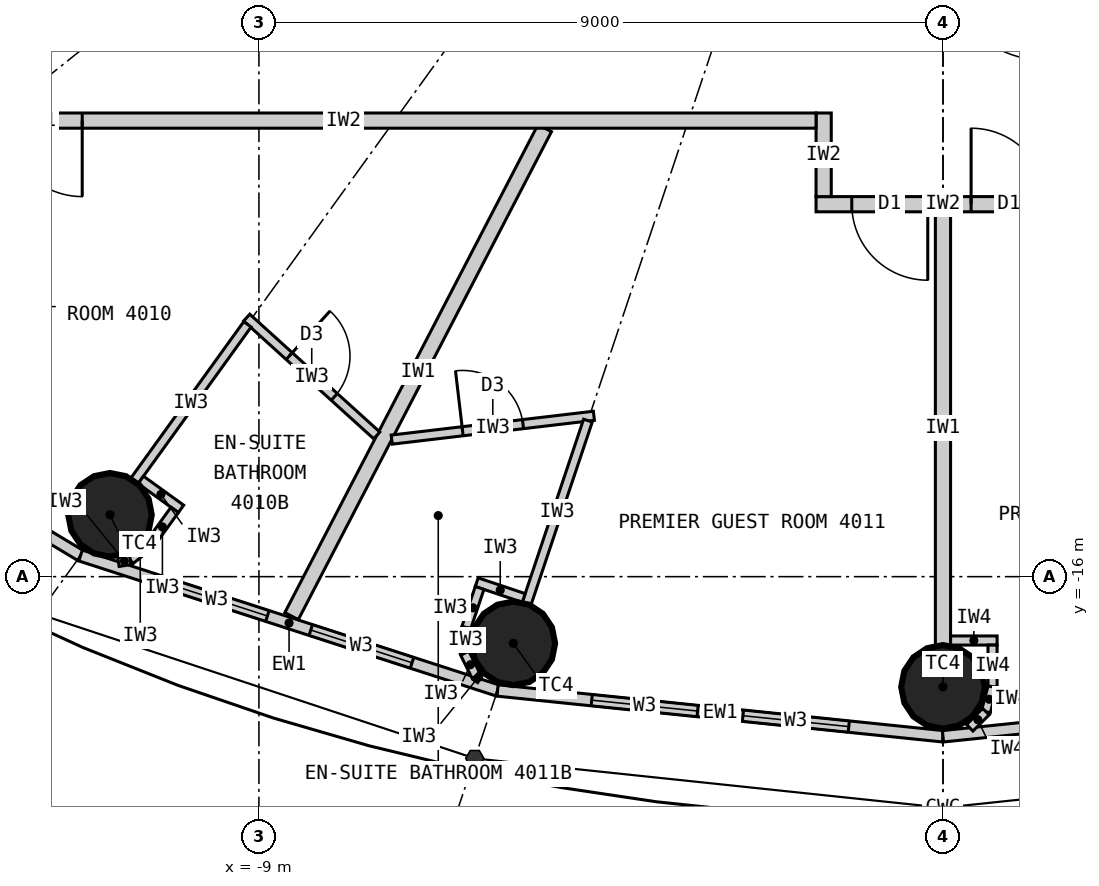
"""IFC4 building model, lengths in metres.
Left out: names, types, materials, properties, quantities, classifications, styles, units other than length and angle.
Written with IfcOpenShell. Run it as: python <this file> out.ifc"""

import sys

from ifc_helpers import new_model, si_unit, direction, frame, frame_2d, origin, origin_2d, place, context, subcontext, project, spatial, rectangle, circle, extrude, element, fill, save


model = new_model("IFC4")
c1 = context("Model", 3, precision=1e-05, world=origin(), true_north=direction((0.0, 1.0)))
c2 = subcontext(c1, "Body", "Model", "MODEL_VIEW")
j1 = project(units=[si_unit("LENGTHUNIT", "METRE"), si_unit("PLANEANGLEUNIT", "RADIAN")], contexts=[c1])
p1 = place(None, origin())
s1 = spatial("IfcSite", under=j1, at=p1, CompositionType="ELEMENT")
p2 = place(p1, origin())
s2 = spatial("IfcBuilding", under=s1, at=p2, CompositionType="ELEMENT")
p3 = place(p2, frame((0.0, 0.0, 153.3)))
s3 = spatial("IfcBuildingStorey", under=s2, at=p3, CompositionType="ELEMENT", Elevation=153.3)
for number, where, z_axis, x_axis in (
    (1, (-10.96, -15.186, 0.0), (0.0, 0.0, 1.0), (1.0, 0.0, 0.0)),
    (2, (-5.653, -16.877, 0.0), (0.0, 0.0, 1.0), (1.0, 0.0, 0.0)),
    (3, (0.0, -17.45, 0.0), (0.0, 0.0, 1.0), (1.0, 0.0, 0.0)),
):
    element("IfcColumn", number, at=place(p3, frame(where, z_axis=z_axis, x_axis=x_axis)), inside=s3, PredefinedType="COLUMN", context=c2, shape_type="SweptSolid", body=[
        extrude(circle(Radius=0.55, at=origin_2d()), origin(), (0.0, 0.0, 1.0), 3.3),
    ])
p4 = place(p3, frame((-16.095, -12.876, 0.0), z_axis=(0.0, 0.0, 1.0), x_axis=(0.857695199231, -0.514158482587, 0.0)))
e4 = element("IfcWall", 4, at=p4, inside=s3, PredefinedType="ELEMENTEDWALL", context=c2, shape_type="SweptSolid", body=[
    extrude(rectangle(XDim=5.536, YDim=0.15, at=frame_2d((2.768, 0.0))), origin(), (0.0, 0.0, 1.0), 3.12),
])
p5 = place(p4, frame((1.068, 0.0, 0.9)))
e5 = element("IfcOpeningElement", 5, at=p5, cuts=e4, PredefinedType="OPENING", context=c2, shape_type="SweptSolid", body=[
    extrude(rectangle(XDim=1.4, YDim=1.9, at=frame_2d((0.7, 0.95))), frame((0.0, 0.085, 0.0), z_axis=(0.0, -1.0, 0.0), x_axis=(1.0, 0.0, 0.0)), (0.0, 0.0, 1.0), 0.17),
])
p6 = place(p4, frame((3.068, 0.0, 0.9)))
e6 = element("IfcOpeningElement", 6, at=p6, cuts=e4, PredefinedType="OPENING", context=c2, shape_type="SweptSolid", body=[
    extrude(rectangle(XDim=1.4, YDim=1.9, at=frame_2d((0.7, 0.95))), frame((0.0, 0.085, 0.0), z_axis=(0.0, -1.0, 0.0), x_axis=(1.0, 0.0, 0.0)), (0.0, 0.0, 1.0), 0.17),
])
p7 = place(p3, frame((-11.346, -15.722, 0.0), z_axis=(0.0, 0.0, 1.0), x_axis=(0.951432482129, -0.307857486429, 0.0)))
e7 = element("IfcWall", 7, at=p7, inside=s3, PredefinedType="ELEMENTEDWALL", context=c2, shape_type="SweptSolid", body=[
    extrude(rectangle(XDim=5.766, YDim=0.15, at=frame_2d((2.883, 0.0))), origin(), (0.0, 0.0, 1.0), 3.12),
])
p8 = place(p7, frame((1.183, 0.0, 0.9)))
e8 = element("IfcOpeningElement", 8, at=p8, cuts=e7, PredefinedType="OPENING", context=c2, shape_type="SweptSolid", body=[
    extrude(rectangle(XDim=1.4, YDim=1.9, at=frame_2d((0.7, 0.95))), frame((0.0, 0.085, 0.0), z_axis=(0.0, -1.0, 0.0), x_axis=(1.0, 0.0, 0.0)), (0.0, 0.0, 1.0), 0.17),
])
p9 = place(p7, frame((3.183, 0.0, 0.9)))
e9 = element("IfcOpeningElement", 9, at=p9, cuts=e7, PredefinedType="OPENING", context=c2, shape_type="SweptSolid", body=[
    extrude(rectangle(XDim=1.4, YDim=1.9, at=frame_2d((0.7, 0.95))), frame((0.0, 0.085, 0.0), z_axis=(0.0, -1.0, 0.0), x_axis=(1.0, 0.0, 0.0)), (0.0, 0.0, 1.0), 0.17),
])
p10 = place(p3, frame((-5.86, -17.497, 0.0), z_axis=(0.0, 0.0, 1.0), x_axis=(0.994751738032, -0.102318032045, 0.0)))
e10 = element("IfcWall", 10, at=p10, inside=s3, PredefinedType="ELEMENTEDWALL", context=c2, shape_type="SweptSolid", body=[
    extrude(rectangle(XDim=5.891, YDim=0.15, at=frame_2d((2.946, 0.0))), origin(), (0.0, 0.0, 1.0), 3.12),
])
p11 = place(p10, frame((1.246, 0.0, 0.9)))
e11 = element("IfcOpeningElement", 11, at=p11, cuts=e10, PredefinedType="OPENING", context=c2, shape_type="SweptSolid", body=[
    extrude(rectangle(XDim=1.4, YDim=1.9, at=frame_2d((0.7, 0.95))), frame((0.0, 0.085, 0.0), z_axis=(0.0, -1.0, 0.0), x_axis=(1.0, 0.0, 0.0)), (0.0, 0.0, 1.0), 0.17),
])
p12 = place(p10, frame((3.246, 0.0, 0.9)))
e12 = element("IfcOpeningElement", 12, at=p12, cuts=e10, PredefinedType="OPENING", context=c2, shape_type="SweptSolid", body=[
    extrude(rectangle(XDim=1.4, YDim=1.9, at=frame_2d((0.7, 0.95))), frame((0.0, 0.085, 0.0), z_axis=(0.0, -1.0, 0.0), x_axis=(1.0, 0.0, 0.0)), (0.0, 0.0, 1.0), 0.17),
])
p13 = place(p3, frame((0.0, -18.1, 0.0), z_axis=(0.0, 0.0, 1.0), x_axis=(0.994751738032, 0.102318032045, 0.0)))
e13 = element("IfcWall", 13, at=p13, inside=s3, PredefinedType="ELEMENTEDWALL", context=c2, shape_type="SweptSolid", body=[
    extrude(rectangle(XDim=5.891, YDim=0.15, at=frame_2d((2.946, 0.0))), origin(), (0.0, 0.0, 1.0), 3.12),
])
p14 = place(p13, frame((1.246, 0.0, 0.9)))
e14 = element("IfcOpeningElement", 14, at=p14, cuts=e13, PredefinedType="OPENING", context=c2, shape_type="SweptSolid", body=[
    extrude(rectangle(XDim=1.4, YDim=1.9, at=frame_2d((0.7, 0.95))), frame((0.0, 0.085, 0.0), z_axis=(0.0, -1.0, 0.0), x_axis=(1.0, 0.0, 0.0)), (0.0, 0.0, 1.0), 0.17),
])
p15 = place(p13, frame((3.246, 0.0, 0.9)))
e15 = element("IfcOpeningElement", 15, at=p15, cuts=e13, PredefinedType="OPENING", context=c2, shape_type="SweptSolid", body=[
    extrude(rectangle(XDim=1.4, YDim=1.9, at=frame_2d((0.7, 0.95))), frame((0.0, 0.085, 0.0), z_axis=(0.0, -1.0, 0.0), x_axis=(1.0, 0.0, 0.0)), (0.0, 0.0, 1.0), 0.17),
])
p16 = place(p3, frame((-5.24, -10.1, 0.0), z_axis=(0.0, 0.0, 1.0), x_axis=(-0.460532965373, -0.887642601391, 0.0)))
e16 = element("IfcWall", 16, at=p16, inside=s3, PredefinedType="PARTITIONING", context=c2, shape_type="SweptSolid", body=[
    extrude(rectangle(XDim=7.231, YDim=0.2, at=frame_2d((3.616, 0.0))), origin(), (0.0, 0.0, 1.0), 3.12),
])
p17 = place(p3, frame((0.0, -11.2, 0.0), z_axis=(0.0, 0.0, 1.0), x_axis=(0.0, -1.0, 0.0)))
e17 = element("IfcWall", 17, at=p17, inside=s3, PredefinedType="PARTITIONING", context=c2, shape_type="SweptSolid", body=[
    extrude(rectangle(XDim=5.7, YDim=0.2, at=frame_2d((2.85, 0.0))), origin(), (0.0, 0.0, 1.0), 2.42),
])
p18 = place(p3, frame((1.67, -11.1, 0.0), z_axis=(0.0, 0.0, 1.0), x_axis=(-1.0, 0.0, 0.0)))
e18 = element("IfcWall", 18, at=p18, inside=s3, PredefinedType="PARTITIONING", context=c2, shape_type="SweptSolid", body=[
    extrude(rectangle(XDim=3.34, YDim=0.2, at=frame_2d((1.67, 0.0))), origin(), (0.0, 0.0, 1.0), 3.12),
])
p19 = place(p18, frame((1.87, 0.0, 0.0)))
e19 = element("IfcOpeningElement", 19, at=p19, cuts=e18, PredefinedType="OPENING", context=c2, shape_type="SweptSolid", body=[
    extrude(rectangle(XDim=1.0, YDim=2.2, at=frame_2d((0.5, 1.1))), frame((0.0, 0.11, 0.0), z_axis=(0.0, -1.0, 0.0), x_axis=(1.0, 0.0, 0.0)), (0.0, 0.0, 1.0), 0.22),
])
p20 = place(p18, frame((0.3, 0.0, 0.0)))
e20 = element("IfcOpeningElement", 20, at=p20, cuts=e18, PredefinedType="OPENING", context=c2, shape_type="SweptSolid", body=[
    extrude(rectangle(XDim=1.0, YDim=2.2, at=frame_2d((0.5, 1.1))), frame((0.0, 0.11, 0.0), z_axis=(0.0, -1.0, 0.0), x_axis=(1.0, 0.0, 0.0)), (0.0, 0.0, 1.0), 0.22),
])
p21 = place(p3, frame((-1.57, -9.9, 0.0), z_axis=(0.0, 0.0, 1.0), x_axis=(0.0, -1.0, 0.0)))
e21 = element("IfcWall", 21, at=p21, inside=s3, PredefinedType="PARTITIONING", context=c2, shape_type="SweptSolid", body=[
    extrude(rectangle(XDim=1.1, YDim=0.2, at=frame_2d((0.55, 0.0))), origin(), (0.0, 0.0, 1.0), 3.12),
])
p22 = place(p3, frame((-7.45, -14.142, 0.0), z_axis=(0.0, 0.0, 1.0), x_axis=(-0.74113984586, 0.671350675041, 0.0)))
e22 = element("IfcWall", 22, at=p22, inside=s3, PredefinedType="PARTITIONING", context=c2, shape_type="SweptSolid", body=[
    extrude(rectangle(XDim=2.309, YDim=0.12, at=frame_2d((1.154, 0.0))), origin(), (0.0, 0.0, 1.0), 3.12),
])
p23 = place(p22, frame((0.754, 0.0, 0.0)))
e23 = element("IfcOpeningElement", 23, at=p23, cuts=e22, PredefinedType="OPENING", context=c2, shape_type="SweptSolid", body=[
    extrude(rectangle(XDim=0.8, YDim=2.1, at=frame_2d((0.4, 1.05))), frame((0.0, 0.07, 0.0), z_axis=(0.0, -1.0, 0.0), x_axis=(1.0, 0.0, 0.0)), (0.0, 0.0, 1.0), 0.14),
])
p24 = place(p3, frame((-9.151, -12.681, 0.0), z_axis=(0.0, 0.0, 1.0), x_axis=(-0.585258912334, -0.8108464747, 0.0)))
e24 = element("IfcWall", 24, at=p24, inside=s3, PredefinedType="PARTITIONING", context=c2, shape_type="SweptSolid", body=[
    extrude(rectangle(XDim=2.54, YDim=0.12, at=frame_2d((1.27, 0.0))), origin(), (0.0, 0.0, 1.0), 2.42),
])
p25 = place(p3, frame((-10.554, -14.727, 0.0), z_axis=(0.0, 0.0, 1.0), x_axis=(0.811044231224, -0.584984833135, 0.0)))
e25 = element("IfcWall", 25, at=p25, inside=s3, PredefinedType="PARTITIONING", context=c2, shape_type="SweptSolid", body=[
    extrude(rectangle(XDim=0.652, YDim=0.12, at=frame_2d((0.326, 0.0))), origin(), (0.0, 0.0, 1.0), 3.12),
])
p26 = place(p3, frame((-10.109, -15.122, 0.0), z_axis=(0.0, 0.0, 1.0), x_axis=(-0.585344718358, -0.810784534072, 0.0)))
e26 = element("IfcWall", 26, at=p26, inside=s3, PredefinedType="PARTITIONING", context=c2, shape_type="SweptSolid", body=[
    extrude(rectangle(XDim=0.55, YDim=0.12, at=frame_2d((0.275, 0.0))), origin(), (0.0, 0.0, 1.0), 3.12),
])
p27 = place(p3, frame((-10.431, -15.568, 0.0), z_axis=(0.0, 0.0, 1.0), x_axis=(-0.77505137267, -0.631898227345, 0.0)))
e27 = element("IfcWall", 27, at=p27, inside=s3, PredefinedType="PARTITIONING", context=c2, shape_type="SweptSolid", body=[
    extrude(rectangle(XDim=0.338, YDim=0.12, at=frame_2d((0.169, 0.0))), origin(), (0.0, 0.0, 1.0), 3.12),
])
p28 = place(p3, frame((-10.693, -15.781, 0.0), z_axis=(0.0, 0.0, 1.0), x_axis=(-0.987256785332, -0.159135287777, 0.0)))
e28 = element("IfcWall", 28, at=p28, inside=s3, PredefinedType="PARTITIONING", context=c2, shape_type="SweptSolid", body=[
    extrude(rectangle(XDim=0.158, YDim=0.12, at=frame_2d((0.079, 0.0))), origin(), (0.0, 0.0, 1.0), 3.12),
])
p29 = place(p3, frame((-7.253, -14.197, 0.0), z_axis=(0.0, 0.0, 1.0), x_axis=(0.993128188393, 0.117031625725, 0.0)))
e29 = element("IfcWall", 29, at=p29, inside=s3, PredefinedType="PARTITIONING", context=c2, shape_type="SweptSolid", body=[
    extrude(rectangle(XDim=2.678, YDim=0.12, at=frame_2d((1.339, 0.0))), origin(), (0.0, 0.0, 1.0), 3.12),
])
p30 = place(p29, frame((0.939, 0.0, 0.0)))
e30 = element("IfcOpeningElement", 30, at=p30, cuts=e29, PredefinedType="OPENING", context=c2, shape_type="SweptSolid", body=[
    extrude(rectangle(XDim=0.8, YDim=2.1, at=frame_2d((0.4, 1.05))), frame((0.0, 0.07, 0.0), z_axis=(0.0, -1.0, 0.0), x_axis=(1.0, 0.0, 0.0)), (0.0, 0.0, 1.0), 0.14),
])
p31 = place(p3, frame((-4.671, -13.948, 0.0), z_axis=(0.0, 0.0, 1.0), x_axis=(-0.317669167093, -0.948201613729, 0.0)))
e31 = element("IfcWall", 31, at=p31, inside=s3, PredefinedType="PARTITIONING", context=c2, shape_type="SweptSolid", body=[
    extrude(rectangle(XDim=2.54, YDim=0.12, at=frame_2d((1.27, 0.0))), origin(), (0.0, 0.0, 1.0), 2.42),
])
p32 = place(p3, frame((-5.516, -16.28, 0.0), z_axis=(0.0, 0.0, 1.0), x_axis=(-0.948157944392, 0.317799484717, 0.0)))
e32 = element("IfcWall", 32, at=p32, inside=s3, PredefinedType="PARTITIONING", context=c2, shape_type="SweptSolid", body=[
    extrude(rectangle(XDim=0.652, YDim=0.12, at=frame_2d((0.326, 0.0))), origin(), (0.0, 0.0, 1.0), 3.12),
])
p33 = place(p3, frame((-6.097, -16.149, 0.0), z_axis=(0.0, 0.0, 1.0), x_axis=(-0.317292604854, -0.948327687514, 0.0)))
e33 = element("IfcWall", 33, at=p33, inside=s3, PredefinedType="PARTITIONING", context=c2, shape_type="SweptSolid", body=[
    extrude(rectangle(XDim=0.55, YDim=0.12, at=frame_2d((0.275, 0.0))), origin(), (0.0, 0.0, 1.0), 3.12),
])
for number, where, z_axis, x_axis in (
    (34, (-6.271, -16.67, 0.0), (0.0, 0.0, 1.0), (-0.061, -0.998, 0.0)),
    (35, (-6.292, -17.007, 0.0), (0.0, 0.0, 1.0), (0.445, -0.895, 0.0)),
):
    element("IfcWall", number, at=place(p3, frame(where, z_axis=z_axis, x_axis=x_axis)), inside=s3, PredefinedType="PARTITIONING", context=c2, shape_type="SweptSolid", body=[
        extrude(rectangle(XDim=0.338, YDim=0.12, at=frame_2d((0.169, 0.0))), origin(), (0.0, 0.0, 1.0), 3.12),
    ])
p34 = place(p3, frame((-6.142, -17.31, 0.0), z_axis=(0.0, 0.0, 1.0), x_axis=(0.835039693181, -0.550189704386, 0.0)))
e36 = element("IfcWall", 36, at=p34, inside=s3, PredefinedType="PARTITIONING", context=c2, shape_type="SweptSolid", body=[
    extrude(rectangle(XDim=0.062, YDim=0.12, at=frame_2d((0.031, 0.0))), origin(), (0.0, 0.0, 1.0), 3.12),
])
p35 = place(p3, frame((-1.67, -10.0, 0.0), z_axis=(0.0, 0.0, 1.0), x_axis=(-1.0, 0.0, 0.0)))
e37 = element("IfcWall", 37, at=p35, inside=s3, PredefinedType="PARTITIONING", context=c2, shape_type="SweptSolid", body=[
    extrude(rectangle(XDim=12.43, YDim=0.2, at=frame_2d((6.215, 0.0))), origin(), (0.0, 0.0, 1.0), 3.12),
])
p36 = place(p35, frame((9.655, 0.0, 0.0)))
e38 = element("IfcOpeningElement", 38, at=p36, cuts=e37, PredefinedType="OPENING", context=c2, shape_type="SweptSolid", body=[
    extrude(rectangle(XDim=1.0, YDim=2.2, at=frame_2d((0.5, 1.1))), frame((0.0, 0.11, 0.0), z_axis=(0.0, -1.0, 0.0), x_axis=(1.0, 0.0, 0.0)), (0.0, 0.0, 1.0), 0.22),
])
p37 = place(p3, frame((0.1, -16.84, 0.0), z_axis=(0.0, 0.0, 1.0), x_axis=(1.0, 0.0, 0.0)))
e39 = element("IfcWall", 39, at=p37, inside=s3, PredefinedType="PARTITIONING", context=c2, shape_type="SweptSolid", body=[
    extrude(rectangle(XDim=0.612, YDim=0.12, at=frame_2d((0.306, 0.0))), origin(), (0.0, 0.0, 1.0), 3.12),
])
p38 = place(p3, frame((0.652, -16.9, 0.0), z_axis=(0.0, 0.0, 1.0), x_axis=(0.0, -1.0, 0.0)))
e40 = element("IfcWall", 40, at=p38, inside=s3, PredefinedType="PARTITIONING", context=c2, shape_type="SweptSolid", body=[
    extrude(rectangle(XDim=0.55, YDim=0.12, at=frame_2d((0.275, 0.0))), origin(), (0.0, 0.0, 1.0), 3.12),
])
p39 = place(p3, frame((0.652, -17.45, 0.0), z_axis=(0.0, 0.0, 1.0), x_axis=(-0.258832454679, -0.965922233104, 0.0)))
e41 = element("IfcWall", 41, at=p39, inside=s3, PredefinedType="PARTITIONING", context=c2, shape_type="SweptSolid", body=[
    extrude(rectangle(XDim=0.338, YDim=0.12, at=frame_2d((0.169, 0.0))), origin(), (0.0, 0.0, 1.0), 3.12),
])
p40 = place(p3, frame((0.565, -17.776, 0.0), z_axis=(0.0, 0.0, 1.0), x_axis=(-0.707106781187, -0.707106781187, 0.0)))
e42 = element("IfcWall", 42, at=p40, inside=s3, PredefinedType="PARTITIONING", context=c2, shape_type="SweptSolid", body=[
    extrude(rectangle(XDim=0.301, YDim=0.12, at=frame_2d((0.15, 0.0))), origin(), (0.0, 0.0, 1.0), 3.12),
])
p41 = place(p8, origin())
e43 = element("IfcWindow", 43, at=p41, inside=s3, PartitioningType="SINGLE_PANEL", PredefinedType="WINDOW", context=c2, shape_type="SweptSolid", body=[
    extrude(rectangle(XDim=1.4, YDim=1.9, at=frame_2d((0.7, 0.95))), frame((0.0, 0.03, 0.0), z_axis=(0.0, -1.0, 0.0), x_axis=(1.0, 0.0, 0.0)), (0.0, 0.0, 1.0), 0.06),
])
fill(e8, e43)
p42 = place(p9, origin())
e44 = element("IfcWindow", 44, at=p42, inside=s3, PartitioningType="SINGLE_PANEL", PredefinedType="WINDOW", context=c2, shape_type="SweptSolid", body=[
    extrude(rectangle(XDim=1.4, YDim=1.9, at=frame_2d((0.7, 0.95))), frame((0.0, 0.03, 0.0), z_axis=(0.0, -1.0, 0.0), x_axis=(1.0, 0.0, 0.0)), (0.0, 0.0, 1.0), 0.06),
])
fill(e9, e44)
p43 = place(p11, origin())
e45 = element("IfcWindow", 45, at=p43, inside=s3, PartitioningType="SINGLE_PANEL", PredefinedType="WINDOW", context=c2, shape_type="SweptSolid", body=[
    extrude(rectangle(XDim=1.4, YDim=1.9, at=frame_2d((0.7, 0.95))), frame((0.0, 0.03, 0.0), z_axis=(0.0, -1.0, 0.0), x_axis=(1.0, 0.0, 0.0)), (0.0, 0.0, 1.0), 0.06),
])
fill(e11, e45)
p44 = place(p12, origin())
e46 = element("IfcWindow", 46, at=p44, inside=s3, PartitioningType="SINGLE_PANEL", PredefinedType="WINDOW", context=c2, shape_type="SweptSolid", body=[
    extrude(rectangle(XDim=1.4, YDim=1.9, at=frame_2d((0.7, 0.95))), frame((0.0, 0.03, 0.0), z_axis=(0.0, -1.0, 0.0), x_axis=(1.0, 0.0, 0.0)), (0.0, 0.0, 1.0), 0.06),
])
fill(e12, e46)
p45 = place(p23, origin())
e47 = element("IfcDoor", 47, at=p45, inside=s3, OperationType="SINGLE_SWING_RIGHT", PredefinedType="DOOR", context=c2, shape_type="SweptSolid", body=[
    extrude(rectangle(XDim=0.8, YDim=2.1, at=frame_2d((0.4, 1.05))), frame((0.0, 0.025, 0.0), z_axis=(0.0, -1.0, 0.0), x_axis=(1.0, 0.0, 0.0)), (0.0, 0.0, 1.0), 0.05),
])
fill(e23, e47)
p46 = place(p36, origin())
e48 = element("IfcDoor", 48, at=p46, inside=s3, OperationType="SINGLE_SWING_LEFT", PredefinedType="DOOR", context=c2, shape_type="SweptSolid", body=[
    extrude(rectangle(XDim=1.0, YDim=2.2, at=frame_2d((0.5, 1.1))), frame((0.0, 0.025, 0.0), z_axis=(0.0, -1.0, 0.0), x_axis=(1.0, 0.0, 0.0)), (0.0, 0.0, 1.0), 0.05),
])
fill(e38, e48)
p47 = place(p30, origin())
e49 = element("IfcDoor", 49, at=p47, inside=s3, OperationType="SINGLE_SWING_LEFT", PredefinedType="DOOR", context=c2, shape_type="SweptSolid", body=[
    extrude(rectangle(XDim=0.8, YDim=2.1, at=frame_2d((0.4, 1.05))), frame((0.0, 0.025, 0.0), z_axis=(0.0, -1.0, 0.0), x_axis=(1.0, 0.0, 0.0)), (0.0, 0.0, 1.0), 0.05),
])
fill(e30, e49)
p48 = place(p19, origin())
e50 = element("IfcDoor", 50, at=p48, inside=s3, OperationType="SINGLE_SWING_LEFT", PredefinedType="DOOR", context=c2, shape_type="SweptSolid", body=[
    extrude(rectangle(XDim=1.0, YDim=2.2, at=frame_2d((0.5, 1.1))), frame((0.0, 0.025, 0.0), z_axis=(0.0, -1.0, 0.0), x_axis=(1.0, 0.0, 0.0)), (0.0, 0.0, 1.0), 0.05),
])
fill(e19, e50)
p49 = place(p20, origin())
e51 = element("IfcDoor", 51, at=p49, inside=s3, OperationType="SINGLE_SWING_RIGHT", PredefinedType="DOOR", context=c2, shape_type="SweptSolid", body=[
    extrude(rectangle(XDim=1.0, YDim=2.2, at=frame_2d((0.5, 1.1))), frame((0.0, 0.025, 0.0), z_axis=(0.0, -1.0, 0.0), x_axis=(1.0, 0.0, 0.0)), (0.0, 0.0, 1.0), 0.05),
])
fill(e20, e51)
save(model, sys.argv[1])
